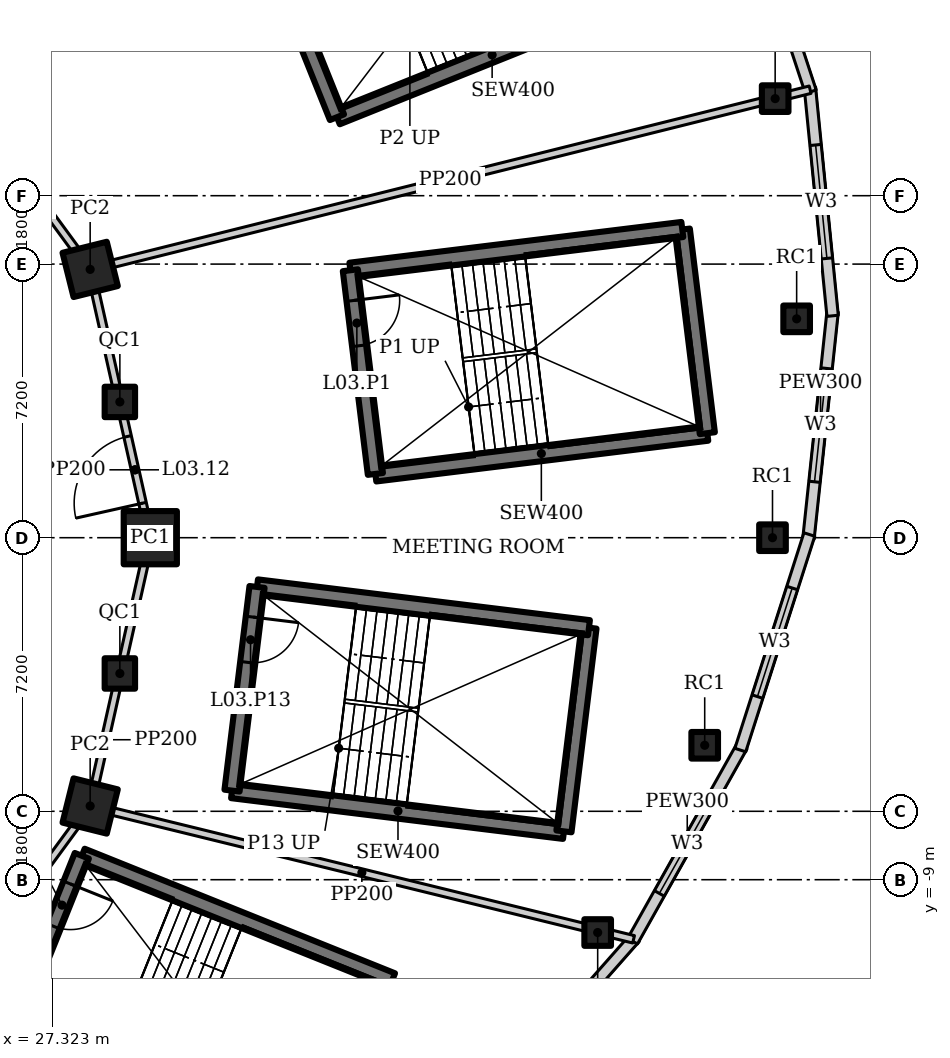
"""IFC4 building model, lengths in metres.
Left out: names, types, materials, properties, quantities, classifications, styles, units other than length and angle.
Written with IfcOpenShell. Run it as: python <this file> out.ifc"""

import sys

from ifc_helpers import new_model, si_unit, direction, frame, frame_2d, origin, origin_2d, place, context, subcontext, project, spatial, rectangle, hollow_rectangle, extrude, element, fill, save


model = new_model("IFC4")
c1 = context("Model", 3, precision=1e-05, world=origin(), true_north=direction((0.0, 1.0)))
c2 = subcontext(c1, "Body", "Model", "MODEL_VIEW")
j1 = project(units=[si_unit("LENGTHUNIT", "METRE"), si_unit("PLANEANGLEUNIT", "RADIAN")], contexts=[c1])
p1 = place(None, origin())
s1 = spatial("IfcSite", under=j1, at=p1, CompositionType="ELEMENT")
p2 = place(p1, origin())
s2 = spatial("IfcBuilding", under=s1, at=p2, CompositionType="ELEMENT")
p3 = place(p2, frame((0.0, 0.0, 22.0)))
s3 = spatial("IfcBuildingStorey", under=s2, at=p3, CompositionType="ELEMENT", Elevation=22.0)
p4 = place(p3, frame((29.9, 0.0, 0.0), z_axis=(0.0, 0.0, 1.0), x_axis=(1.0, 0.0, 0.0)))
e1 = element("IfcColumn", 1, at=p4, inside=s3, PredefinedType="COLUMN", context=c2, shape_type="SweptSolid", body=[
    extrude(hollow_rectangle(XDim=1.4, YDim=1.4, WallThickness=0.1, at=origin_2d()), origin(), (0.0, 0.0, 1.0), 5.0),
])
for number, where, z_axis, x_axis in (
    (2, (28.318, 7.06, 0.0), (0.0, 0.0, 1.0), (0.97, 0.242, 0.0)),
    (3, (28.318, -7.06, 0.0), (0.0, 0.0, 1.0), (0.242, 0.97, 0.0)),
):
    element("IfcColumn", number, at=place(p3, frame(where, z_axis=z_axis, x_axis=x_axis)), inside=s3, PredefinedType="COLUMN", context=c2, shape_type="SweptSolid", body=[
        extrude(hollow_rectangle(XDim=1.2, YDim=1.2, WallThickness=0.1, at=origin_2d()), origin(), (0.0, 0.0, 1.0), 5.0),
    ])
for number, where, z_axis, x_axis in (
    (4, (29.099, 3.573, 0.0), (0.0, 0.0, 1.0), (1.0, 0.0, 0.0)),
    (5, (29.099, -3.573, 0.0), (0.0, 0.0, 1.0), (1.0, 0.0, 0.0)),
):
    element("IfcColumn", number, at=place(p3, frame(where, z_axis=z_axis, x_axis=x_axis)), inside=s3, PredefinedType="COLUMN", context=c2, shape_type="SweptSolid", body=[
        extrude(hollow_rectangle(XDim=0.8, YDim=0.8, WallThickness=0.05, at=origin_2d()), origin(), (0.0, 0.0, 1.0), 5.0),
    ])
for number, where, z_axis, x_axis in (
    (6, (46.908, 5.76, 0.0), (0.0, 0.0, 1.0), (1.0, 0.0, 0.0)),
    (7, (44.489, -5.462, 0.0), (0.0, 0.0, 1.0), (1.0, 0.0, 0.0)),
    (8, (46.272, 0.0, 0.0), (0.0, 0.0, 1.0), (1.0, 0.0, 0.0)),
    (9, (46.343, 11.554, 0.0), (0.0, 0.0, 1.0), (1.0, 0.0, 0.0)),
    (10, (41.672, -10.39, 0.0), (0.0, 0.0, 1.0), (1.0, 0.0, 0.0)),
):
    element("IfcColumn", number, at=place(p3, frame(where, z_axis=z_axis, x_axis=x_axis)), inside=s3, PredefinedType="COLUMN", context=c2, shape_type="SweptSolid", body=[
        extrude(hollow_rectangle(XDim=0.7, YDim=0.7, WallThickness=0.04, at=origin_2d()), origin(), (0.0, 0.0, 1.0), 5.0),
    ])
p5 = place(p3, frame((47.219, -0.024, 0.0), z_axis=(0.0, 0.0, 1.0), x_axis=(0.105835648981, 0.99438363593, 0.0)))
e11 = element("IfcWall", 11, at=p5, inside=s3, PredefinedType="SOLIDWALL", context=c2, shape_type="SweptSolid", body=[
    extrude(rectangle(XDim=6.007, YDim=0.3, at=frame_2d((3.003, 0.0))), origin(), (0.0, 0.0, 1.0), 4.8),
])
p6 = place(p5, frame((1.503, 0.0, 0.9)))
e12 = element("IfcOpeningElement", 12, at=p6, cuts=e11, PredefinedType="OPENING", context=c2, shape_type="SweptSolid", body=[
    extrude(rectangle(XDim=3.0, YDim=2.0, at=frame_2d((1.5, 1.0))), frame((0.0, 0.16, 0.0), z_axis=(0.0, -1.0, 0.0), x_axis=(1.0, 0.0, 0.0)), (0.0, 0.0, 1.0), 0.32),
])
p7 = place(p3, frame((47.854, 5.839, 0.0), z_axis=(0.0, 0.0, 1.0), x_axis=(-0.099051198898, 0.9950823383, 0.0)))
e13 = element("IfcWall", 13, at=p7, inside=s3, PredefinedType="SOLIDWALL", context=c2, shape_type="SweptSolid", body=[
    extrude(rectangle(XDim=6.036, YDim=0.3, at=frame_2d((3.018, 0.0))), origin(), (0.0, 0.0, 1.0), 4.8),
])
p8 = place(p7, frame((1.518, 0.0, 0.9)))
e14 = element("IfcOpeningElement", 14, at=p8, cuts=e13, PredefinedType="OPENING", context=c2, shape_type="SweptSolid", body=[
    extrude(rectangle(XDim=3.0, YDim=2.0, at=frame_2d((1.5, 1.0))), frame((0.0, 0.16, 0.0), z_axis=(0.0, -1.0, 0.0), x_axis=(1.0, 0.0, 0.0)), (0.0, 0.0, 1.0), 0.32),
])
p9 = place(p3, frame((47.28, 11.736, 0.0), z_axis=(0.0, 0.0, 1.0), x_axis=(-0.31263149373, 0.94987449125, 0.0)))
e15 = element("IfcWall", 15, at=p9, inside=s3, PredefinedType="SOLIDWALL", context=c2, shape_type="SweptSolid", body=[
    extrude(rectangle(XDim=6.786, YDim=0.3, at=frame_2d((3.393, 0.0))), origin(), (0.0, 0.0, 1.0), 4.8),
])
p10 = place(p9, frame((1.893, 0.0, 0.9)))
e16 = element("IfcOpeningElement", 16, at=p10, cuts=e15, PredefinedType="OPENING", context=c2, shape_type="SweptSolid", body=[
    extrude(rectangle(XDim=3.0, YDim=2.0, at=frame_2d((1.5, 1.0))), frame((0.0, 0.16, 0.0), z_axis=(0.0, -1.0, 0.0), x_axis=(1.0, 0.0, 0.0)), (0.0, 0.0, 1.0), 0.32),
])
p11 = place(p3, frame((38.368, -15.389, 0.0), z_axis=(0.0, 0.0, 1.0), x_axis=(0.661196672464, 0.75021261008, 0.0)))
e17 = element("IfcWall", 17, at=p11, inside=s3, PredefinedType="SOLIDWALL", context=c2, shape_type="SweptSolid", body=[
    extrude(rectangle(XDim=6.481, YDim=0.3, at=frame_2d((3.24, 0.0))), origin(), (0.0, 0.0, 1.0), 4.8),
])
p12 = place(p11, frame((1.74, 0.0, 0.9)))
e18 = element("IfcOpeningElement", 18, at=p12, cuts=e17, PredefinedType="OPENING", context=c2, shape_type="SweptSolid", body=[
    extrude(rectangle(XDim=3.0, YDim=2.0, at=frame_2d((1.5, 1.0))), frame((0.0, 0.16, 0.0), z_axis=(0.0, -1.0, 0.0), x_axis=(1.0, 0.0, 0.0)), (0.0, 0.0, 1.0), 0.32),
])
p13 = place(p3, frame((42.589, -10.618, 0.0), z_axis=(0.0, 0.0, 1.0), x_axis=(0.489563544979, 0.871967622924, 0.0)))
e19 = element("IfcWall", 19, at=p13, inside=s3, PredefinedType="SOLIDWALL", context=c2, shape_type="SweptSolid", body=[
    extrude(rectangle(XDim=5.883, YDim=0.3, at=frame_2d((2.941, 0.0))), origin(), (0.0, 0.0, 1.0), 4.8),
])
p14 = place(p13, frame((1.441, 0.0, 0.9)))
e20 = element("IfcOpeningElement", 20, at=p14, cuts=e19, PredefinedType="OPENING", context=c2, shape_type="SweptSolid", body=[
    extrude(rectangle(XDim=3.0, YDim=2.0, at=frame_2d((1.5, 1.0))), frame((0.0, 0.16, 0.0), z_axis=(0.0, -1.0, 0.0), x_axis=(1.0, 0.0, 0.0)), (0.0, 0.0, 1.0), 0.32),
])
p15 = place(p3, frame((45.425, -5.589, 0.0), z_axis=(0.0, 0.0, 1.0), x_axis=(0.304991367091, 0.95235511549, 0.0)))
e21 = element("IfcWall", 21, at=p15, inside=s3, PredefinedType="SOLIDWALL", context=c2, shape_type="SweptSolid", body=[
    extrude(rectangle(XDim=5.956, YDim=0.3, at=frame_2d((2.978, 0.0))), origin(), (0.0, 0.0, 1.0), 4.8),
])
p16 = place(p15, frame((1.478, 0.0, 0.9)))
e22 = element("IfcOpeningElement", 22, at=p16, cuts=e21, PredefinedType="OPENING", context=c2, shape_type="SweptSolid", body=[
    extrude(rectangle(XDim=3.0, YDim=2.0, at=frame_2d((1.5, 1.0))), frame((0.0, 0.16, 0.0), z_axis=(0.0, -1.0, 0.0), x_axis=(1.0, 0.0, 0.0)), (0.0, 0.0, 1.0), 0.32),
])
p17 = place(p3, frame((29.9, 0.0, 0.0), z_axis=(0.0, 0.0, 1.0), x_axis=(-0.218631550323, 0.975807483679, 0.0)))
e23 = element("IfcWall", 23, at=p17, inside=s3, PredefinedType="SOLIDWALL", context=c2, shape_type="SweptSolid", body=[
    extrude(rectangle(XDim=3.662, YDim=0.2, at=frame_2d((1.831, 0.0))), origin(), (0.0, 0.0, 1.0), 4.35),
])
p18 = place(p17, frame((0.931, 0.0, 0.0)))
e24 = element("IfcOpeningElement", 24, at=p18, cuts=e23, PredefinedType="OPENING", context=c2, shape_type="SweptSolid", body=[
    extrude(rectangle(XDim=1.8, YDim=2.4, at=frame_2d((0.9, 1.2))), frame((0.0, 0.11, 0.0), z_axis=(0.0, -1.0, 0.0), x_axis=(1.0, 0.0, 0.0)), (0.0, 0.0, 1.0), 0.22),
])
p19 = place(p3, frame((29.099, 3.573, 0.0), z_axis=(0.0, 0.0, 1.0), x_axis=(-0.218673326171, 0.97579812278, 0.0)))
e25 = element("IfcWall", 25, at=p19, inside=s3, PredefinedType="SOLIDWALL", context=c2, shape_type="SweptSolid", body=[
    extrude(rectangle(XDim=3.574, YDim=0.2, at=frame_2d((1.787, 0.0))), origin(), (0.0, 0.0, 1.0), 4.394),
])
p20 = place(p3, frame((28.318, 7.06, 0.0), z_axis=(0.0, 0.0, 1.0), x_axis=(-0.591255937291, 0.806483984105, 0.0)))
e26 = element("IfcWall", 26, at=p20, inside=s3, PredefinedType="SOLIDWALL", context=c2, shape_type="SweptSolid", body=[
    extrude(rectangle(XDim=4.127, YDim=0.2, at=frame_2d((2.063, 0.0))), origin(), (0.0, 0.0, 1.0), 4.396),
])
p21 = place(p3, frame((25.878, -10.388, 0.0), z_axis=(0.0, 0.0, 1.0), x_axis=(0.591255937291, 0.806483984105, 0.0)))
e27 = element("IfcWall", 27, at=p21, inside=s3, PredefinedType="SOLIDWALL", context=c2, shape_type="SweptSolid", body=[
    extrude(rectangle(XDim=4.127, YDim=0.2, at=frame_2d((2.063, 0.0))), origin(), (0.0, 0.0, 1.0), 3.3),
])
p22 = place(p3, frame((28.318, -7.06, 0.0), z_axis=(0.0, 0.0, 1.0), x_axis=(0.218673326171, 0.97579812278, 0.0)))
e28 = element("IfcWall", 28, at=p22, inside=s3, PredefinedType="SOLIDWALL", context=c2, shape_type="SweptSolid", body=[
    extrude(rectangle(XDim=3.574, YDim=0.2, at=frame_2d((1.787, 0.0))), origin(), (0.0, 0.0, 1.0), 4.396),
])
p23 = place(p3, frame((29.099, -3.573, 0.0), z_axis=(0.0, 0.0, 1.0), x_axis=(0.218631550323, 0.975807483679, 0.0)))
e29 = element("IfcWall", 29, at=p23, inside=s3, PredefinedType="SOLIDWALL", context=c2, shape_type="SweptSolid", body=[
    extrude(rectangle(XDim=3.662, YDim=0.2, at=frame_2d((1.831, 0.0))), origin(), (0.0, 0.0, 1.0), 4.272),
])
p24 = place(p3, frame((28.318, 7.06, 0.0), z_axis=(0.0, 0.0, 1.0), x_axis=(0.970227758662, 0.242194335859, 0.0)))
e30 = element("IfcWall", 30, at=p24, inside=s3, PredefinedType="SOLIDWALL", context=c2, shape_type="SweptSolid", body=[
    extrude(rectangle(XDim=19.526, YDim=0.2, at=frame_2d((9.763, 0.0))), origin(), (0.0, 0.0, 1.0), 3.3),
])
p25 = place(p3, frame((28.318, -7.06, 0.0), z_axis=(0.0, 0.0, 1.0), x_axis=(0.971190644534, -0.238303864783, 0.0)))
e31 = element("IfcWall", 31, at=p25, inside=s3, PredefinedType="SOLIDWALL", context=c2, shape_type="SweptSolid", body=[
    extrude(rectangle(XDim=14.723, YDim=0.2, at=frame_2d((7.361, 0.0))), origin(), (0.0, 0.0, 1.0), 3.3),
])
p26 = place(p3, frame((35.823, 1.678, 0.0), z_axis=(0.0, 0.0, 1.0), x_axis=(0.992545280606, 0.121876437212, 0.0)))
e32 = element("IfcWall", 32, at=p26, inside=s3, PredefinedType="SHEAR", context=c2, shape_type="SweptSolid", body=[
    extrude(rectangle(XDim=8.8, YDim=0.4, at=frame_2d((4.4, 0.0))), origin(), (0.0, 0.0, 1.0), 5.0),
])
p27 = place(p3, frame((44.557, 2.751, 0.0), z_axis=(0.0, 0.0, 1.0), x_axis=(-0.12184754212, 0.99254882826, 0.0)))
e33 = element("IfcWall", 33, at=p27, inside=s3, PredefinedType="SHEAR", context=c2, shape_type="SweptSolid", body=[
    extrude(rectangle(XDim=5.4, YDim=0.4, at=frame_2d((2.7, 0.0))), origin(), (0.0, 0.0, 1.0), 5.0),
])
p28 = place(p3, frame((43.899, 8.11, 0.0), z_axis=(0.0, 0.0, 1.0), x_axis=(-0.992545280606, -0.121876437212, 0.0)))
e34 = element("IfcWall", 34, at=p28, inside=s3, PredefinedType="SHEAR", context=c2, shape_type="SweptSolid", body=[
    extrude(rectangle(XDim=8.8, YDim=0.4, at=frame_2d((4.4, 0.0))), origin(), (0.0, 0.0, 1.0), 5.0),
])
p29 = place(p3, frame((35.165, 7.038, 0.0), z_axis=(0.0, 0.0, 1.0), x_axis=(0.12184754212, -0.99254882826, 0.0)))
e35 = element("IfcWall", 35, at=p29, inside=s3, PredefinedType="SHEAR", context=c2, shape_type="SweptSolid", body=[
    extrude(rectangle(XDim=5.4, YDim=0.4, at=frame_2d((2.7, 0.0))), origin(), (0.0, 0.0, 1.0), 5.0),
])
p30 = place(p29, frame((0.8, 0.0, 0.0)))
e36 = element("IfcOpeningElement", 36, at=p30, cuts=e35, PredefinedType="OPENING", context=c2, shape_type="SweptSolid", body=[
    extrude(rectangle(XDim=1.2, YDim=2.1, at=frame_2d((0.6, 1.05))), frame((0.0, 0.21, 0.0), z_axis=(0.0, -1.0, 0.0), x_axis=(1.0, 0.0, 0.0)), (0.0, 0.0, 1.0), 0.42),
])
p31 = place(p3, frame((34.812, 11.065, 0.0), z_axis=(0.0, 0.0, 1.0), x_axis=(0.92801678004, 0.372538395288, 0.0)))
e37 = element("IfcWall", 37, at=p31, inside=s3, PredefinedType="SHEAR", context=c2, shape_type="SweptSolid", body=[
    extrude(rectangle(XDim=8.8, YDim=0.4, at=frame_2d((4.4, 0.0))), origin(), (0.0, 0.0, 1.0), 5.0),
])
p32 = place(p3, frame((32.8, 16.077, 0.0), z_axis=(0.0, 0.0, 1.0), x_axis=(0.372544066459, -0.928014503414, 0.0)))
e38 = element("IfcWall", 38, at=p32, inside=s3, PredefinedType="SHEAR", context=c2, shape_type="SweptSolid", body=[
    extrude(rectangle(XDim=5.4, YDim=0.4, at=frame_2d((2.7, 0.0))), origin(), (0.0, 0.0, 1.0), 5.0),
])
p33 = place(p32, frame((0.8, 0.0, 0.0)))
e39 = element("IfcOpeningElement", 39, at=p33, cuts=e38, PredefinedType="OPENING", context=c2, shape_type="SweptSolid", body=[
    extrude(rectangle(XDim=1.2, YDim=2.1, at=frame_2d((0.6, 1.05))), frame((0.0, 0.21, 0.0), z_axis=(0.0, -1.0, 0.0), x_axis=(1.0, 0.0, 0.0)), (0.0, 0.0, 1.0), 0.42),
])
p34 = place(p3, frame((36.265, -11.649, 0.0), z_axis=(0.0, 0.0, 1.0), x_axis=(-0.928007188331, 0.372562287955, 0.0)))
e40 = element("IfcWall", 40, at=p34, inside=s3, PredefinedType="SHEAR", context=c2, shape_type="SweptSolid", body=[
    extrude(rectangle(XDim=8.8, YDim=0.4, at=frame_2d((4.4, 0.0))), origin(), (0.0, 0.0, 1.0), 5.0),
])
p35 = place(p3, frame((28.099, -8.37, 0.0), z_axis=(0.0, 0.0, 1.0), x_axis=(-0.372528436202, -0.928020777904, 0.0)))
e41 = element("IfcWall", 41, at=p35, inside=s3, PredefinedType="SHEAR", context=c2, shape_type="SweptSolid", body=[
    extrude(rectangle(XDim=5.4, YDim=0.4, at=frame_2d((2.7, 0.0))), origin(), (0.0, 0.0, 1.0), 5.0),
])
p36 = place(p35, frame((0.8, 0.0, 0.0)))
e42 = element("IfcOpeningElement", 42, at=p36, cuts=e41, PredefinedType="OPENING", context=c2, shape_type="SweptSolid", body=[
    extrude(rectangle(XDim=1.2, YDim=2.1, at=frame_2d((0.6, 1.05))), frame((0.0, 0.21, 0.0), z_axis=(0.0, -1.0, 0.0), x_axis=(1.0, 0.0, 0.0)), (0.0, 0.0, 1.0), 0.42),
])
p37 = place(p3, frame((32.051, -6.656, 0.0), z_axis=(0.0, 0.0, 1.0), x_axis=(0.992545280606, -0.121876437212, 0.0)))
e43 = element("IfcWall", 43, at=p37, inside=s3, PredefinedType="SHEAR", context=c2, shape_type="SweptSolid", body=[
    extrude(rectangle(XDim=8.8, YDim=0.4, at=frame_2d((4.4, 0.0))), origin(), (0.0, 0.0, 1.0), 5.0),
])
p38 = place(p3, frame((40.785, -7.728, 0.0), z_axis=(0.0, 0.0, 1.0), x_axis=(0.121892082937, 0.992543359314, 0.0)))
e44 = element("IfcWall", 44, at=p38, inside=s3, PredefinedType="SHEAR", context=c2, shape_type="SweptSolid", body=[
    extrude(rectangle(XDim=5.4, YDim=0.4, at=frame_2d((2.7, 0.0))), origin(), (0.0, 0.0, 1.0), 5.0),
])
p39 = place(p3, frame((41.443, -2.368, 0.0), z_axis=(0.0, 0.0, 1.0), x_axis=(-0.992545692684, 0.121873081252, 0.0)))
e45 = element("IfcWall", 45, at=p39, inside=s3, PredefinedType="SHEAR", context=c2, shape_type="SweptSolid", body=[
    extrude(rectangle(XDim=8.8, YDim=0.4, at=frame_2d((4.4, 0.0))), origin(), (0.0, 0.0, 1.0), 5.0),
])
p40 = place(p3, frame((32.708, -1.296, 0.0), z_axis=(0.0, 0.0, 1.0), x_axis=(-0.12184754212, -0.99254882826, 0.0)))
e46 = element("IfcWall", 46, at=p40, inside=s3, PredefinedType="SHEAR", context=c2, shape_type="SweptSolid", body=[
    extrude(rectangle(XDim=5.4, YDim=0.4, at=frame_2d((2.7, 0.0))), origin(), (0.0, 0.0, 1.0), 5.0),
])
p41 = place(p40, frame((0.8, 0.0, 0.0)))
e47 = element("IfcOpeningElement", 47, at=p41, cuts=e46, PredefinedType="OPENING", context=c2, shape_type="SweptSolid", body=[
    extrude(rectangle(XDim=1.2, YDim=2.1, at=frame_2d((0.6, 1.05))), frame((0.0, 0.21, 0.0), z_axis=(0.0, -1.0, 0.0), x_axis=(1.0, 0.0, 0.0)), (0.0, 0.0, 1.0), 0.42),
])
p42 = place(p6, origin())
e48 = element("IfcWindow", 48, at=p42, inside=s3, PartitioningType="SINGLE_PANEL", PredefinedType="WINDOW", context=c2, shape_type="SweptSolid", body=[
    extrude(rectangle(XDim=3.0, YDim=2.0, at=frame_2d((1.5, 1.0))), frame((0.0, 0.03, 0.0), z_axis=(0.0, -1.0, 0.0), x_axis=(1.0, 0.0, 0.0)), (0.0, 0.0, 1.0), 0.06),
])
fill(e12, e48)
p43 = place(p8, origin())
e49 = element("IfcWindow", 49, at=p43, inside=s3, PartitioningType="SINGLE_PANEL", PredefinedType="WINDOW", context=c2, shape_type="SweptSolid", body=[
    extrude(rectangle(XDim=3.0, YDim=2.0, at=frame_2d((1.5, 1.0))), frame((0.0, 0.03, 0.0), z_axis=(0.0, -1.0, 0.0), x_axis=(1.0, 0.0, 0.0)), (0.0, 0.0, 1.0), 0.06),
])
fill(e14, e49)
p44 = place(p14, origin())
e50 = element("IfcWindow", 50, at=p44, inside=s3, PartitioningType="SINGLE_PANEL", PredefinedType="WINDOW", context=c2, shape_type="SweptSolid", body=[
    extrude(rectangle(XDim=3.0, YDim=2.0, at=frame_2d((1.5, 1.0))), frame((0.0, 0.03, 0.0), z_axis=(0.0, -1.0, 0.0), x_axis=(1.0, 0.0, 0.0)), (0.0, 0.0, 1.0), 0.06),
])
fill(e20, e50)
p45 = place(p16, origin())
e51 = element("IfcWindow", 51, at=p45, inside=s3, PartitioningType="SINGLE_PANEL", PredefinedType="WINDOW", context=c2, shape_type="SweptSolid", body=[
    extrude(rectangle(XDim=3.0, YDim=2.0, at=frame_2d((1.5, 1.0))), frame((0.0, 0.03, 0.0), z_axis=(0.0, -1.0, 0.0), x_axis=(1.0, 0.0, 0.0)), (0.0, 0.0, 1.0), 0.06),
])
fill(e22, e51)
p46 = place(p18, origin())
e52 = element("IfcDoor", 52, at=p46, inside=s3, OperationType="DOUBLE_DOOR_DOUBLE_SWING", PredefinedType="DOOR", context=c2, shape_type="SweptSolid", body=[
    extrude(rectangle(XDim=1.8, YDim=2.4, at=frame_2d((0.9, 1.2))), frame((0.0, 0.025, 0.0), z_axis=(0.0, -1.0, 0.0), x_axis=(1.0, 0.0, 0.0)), (0.0, 0.0, 1.0), 0.05),
])
fill(e24, e52)
p47 = place(p30, origin())
e53 = element("IfcDoor", 53, at=p47, inside=s3, OperationType="SINGLE_SWING_RIGHT", PredefinedType="DOOR", context=c2, shape_type="SweptSolid", body=[
    extrude(rectangle(XDim=1.2, YDim=2.1, at=frame_2d((0.6, 1.05))), frame((0.0, 0.025, 0.0), z_axis=(0.0, -1.0, 0.0), x_axis=(1.0, 0.0, 0.0)), (0.0, 0.0, 1.0), 0.05),
])
fill(e36, e53)
p48 = place(p36, origin())
e54 = element("IfcDoor", 54, at=p48, inside=s3, OperationType="SINGLE_SWING_RIGHT", PredefinedType="DOOR", context=c2, shape_type="SweptSolid", body=[
    extrude(rectangle(XDim=1.2, YDim=2.1, at=frame_2d((0.6, 1.05))), frame((0.0, 0.025, 0.0), z_axis=(0.0, -1.0, 0.0), x_axis=(1.0, 0.0, 0.0)), (0.0, 0.0, 1.0), 0.05),
])
fill(e42, e54)
p49 = place(p41, origin())
e55 = element("IfcDoor", 55, at=p49, inside=s3, OperationType="SINGLE_SWING_RIGHT", PredefinedType="DOOR", context=c2, shape_type="SweptSolid", body=[
    extrude(rectangle(XDim=1.2, YDim=2.1, at=frame_2d((0.6, 1.05))), frame((0.0, 0.025, 0.0), z_axis=(0.0, -1.0, 0.0), x_axis=(1.0, 0.0, 0.0)), (0.0, 0.0, 1.0), 0.05),
])
fill(e47, e55)
save(model, sys.argv[1])
